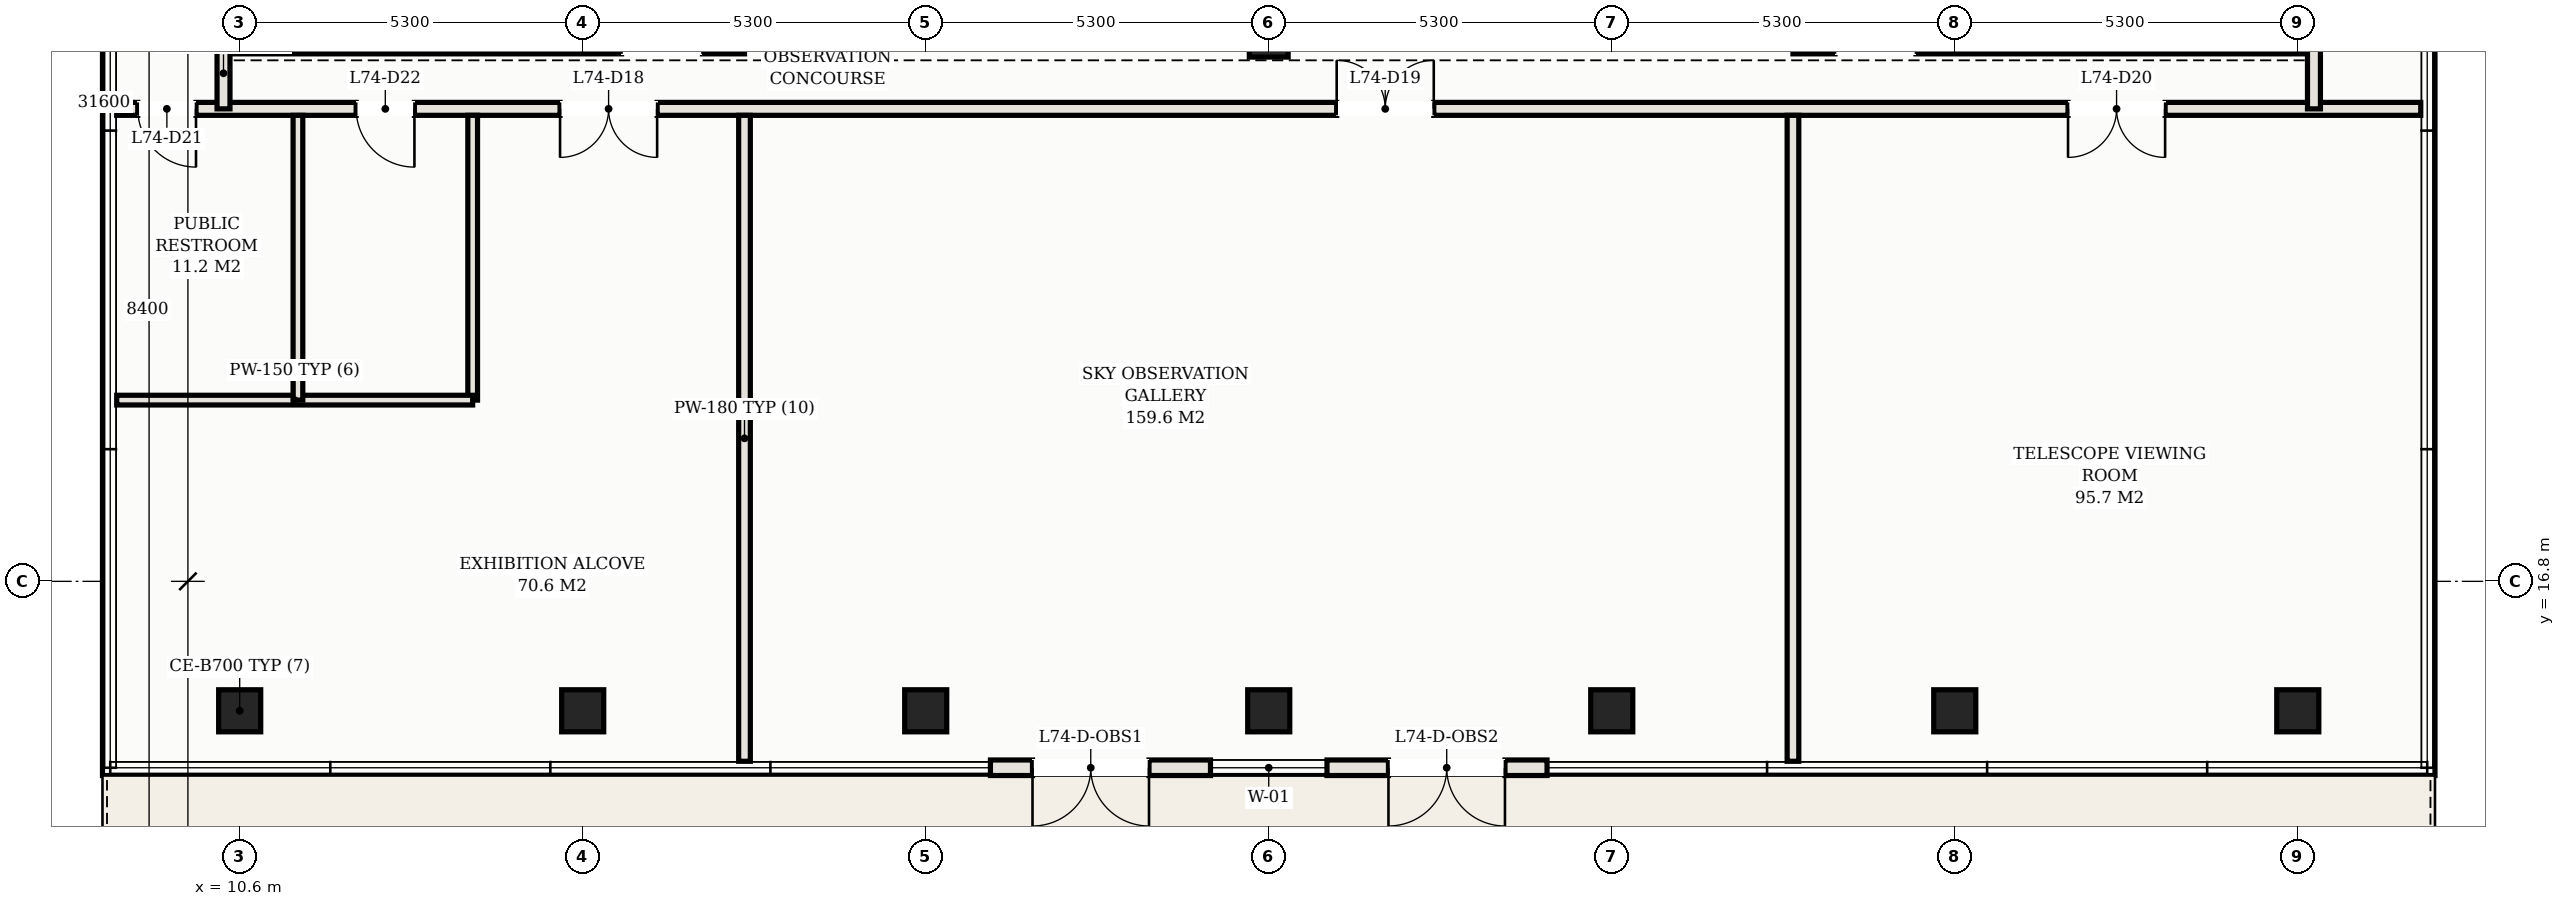
"""IFC4 building model, lengths in metres.
Left out: names, types, materials, properties, quantities, classifications, styles, units other than length and angle.
Written with IfcOpenShell. Run it as: python <this file> out.ifc"""

import sys

from ifc_helpers import new_model, si_unit, direction, frame, frame_2d, origin, origin_2d, place, context, subcontext, project, spatial, rectangle, hollow_rectangle, extrude, element, fill, save


model = new_model("IFC4")
c1 = context("Model", 3, precision=1e-05, world=origin(), true_north=direction((0.0, 1.0)))
c2 = subcontext(c1, "Body", "Model", "MODEL_VIEW")
j1 = project(units=[si_unit("LENGTHUNIT", "METRE"), si_unit("PLANEANGLEUNIT", "RADIAN")], contexts=[c1])
p1 = place(None, origin())
s1 = spatial("IfcSite", under=j1, at=p1, CompositionType="ELEMENT")
p2 = place(p1, origin())
s2 = spatial("IfcBuilding", under=s1, at=p2, CompositionType="ELEMENT")
p3 = place(p2, frame((0.0, 0.0, 266.0)))
s3 = spatial("IfcBuildingStorey", under=s2, at=p3, CompositionType="ELEMENT", Elevation=266.0)
p4 = place(p3, frame((10.35, 25.2, 0.0), z_axis=(0.0, 0.0, 1.0), x_axis=(1.0, 0.0, 0.0)))
e1 = element("IfcWall", 1, at=p4, inside=s3, PredefinedType="SHEAR", context=c2, shape_type="SweptSolid", body=[
    extrude(rectangle(XDim=8.05, YDim=0.5, at=frame_2d((4.025, 0.0))), origin(), (0.0, 0.0, 1.0), 4.52),
])
p5 = place(p4, frame((6.15, 0.0, 0.0)))
e2 = element("IfcOpeningElement", 2, at=p5, cuts=e1, PredefinedType="OPENING", context=c2, shape_type="SweptSolid", body=[
    extrude(rectangle(XDim=1.25, YDim=2.2, at=frame_2d((0.625, 1.1))), frame((0.0, 0.26, 0.0), z_axis=(0.0, -1.0, 0.0), x_axis=(1.0, 0.0, 0.0)), (0.0, 0.0, 1.0), 0.52),
])
p6 = place(p3, frame((34.6, 25.2, 0.0), z_axis=(0.0, 0.0, 1.0), x_axis=(1.0, 0.0, 0.0)))
e3 = element("IfcWall", 3, at=p6, inside=s3, PredefinedType="SHEAR", context=c2, shape_type="SweptSolid", body=[
    extrude(rectangle(XDim=8.05, YDim=0.5, at=frame_2d((4.025, 0.0))), origin(), (0.0, 0.0, 1.0), 4.52),
])
p7 = place(p6, frame((0.65, 0.0, 0.0)))
e4 = element("IfcOpeningElement", 4, at=p7, cuts=e3, PredefinedType="OPENING", context=c2, shape_type="SweptSolid", body=[
    extrude(rectangle(XDim=1.25, YDim=2.2, at=frame_2d((0.625, 1.1))), frame((0.0, 0.26, 0.0), z_axis=(0.0, -1.0, 0.0), x_axis=(1.0, 0.0, 0.0)), (0.0, 0.0, 1.0), 0.52),
])
p8 = place(p3, frame((26.5, 25.2, 0.0), z_axis=(0.0, 0.0, 1.0), x_axis=(1.0, 0.0, 0.0)))
e5 = element("IfcColumn", 5, at=p8, inside=s3, PredefinedType="COLUMN", context=c2, shape_type="SweptSolid", body=[
    extrude(hollow_rectangle(XDim=0.6, YDim=0.6, WallThickness=0.022, at=origin_2d()), origin(), (0.0, 0.0, 1.0), 4.8),
])
for number, where, z_axis, x_axis in (
    (6, (15.9, 14.8, 0.0), (0.0, 0.0, 1.0), (1.0, 0.0, 0.0)),
    (7, (21.2, 14.8, 0.0), (0.0, 0.0, 1.0), (1.0, 0.0, 0.0)),
    (8, (26.5, 14.8, 0.0), (0.0, 0.0, 1.0), (1.0, 0.0, 0.0)),
    (9, (31.8, 14.8, 0.0), (0.0, 0.0, 1.0), (1.0, 0.0, 0.0)),
    (10, (37.1, 14.8, 0.0), (0.0, 0.0, 1.0), (1.0, 0.0, 0.0)),
):
    element("IfcColumn", number, at=place(p3, frame(where, z_axis=z_axis, x_axis=x_axis)), inside=s3, PredefinedType="COLUMN", context=c2, shape_type="SweptSolid", body=[
        extrude(hollow_rectangle(XDim=0.65, YDim=0.65, WallThickness=0.022, at=origin_2d()), origin(), (0.0, 0.0, 1.0), 4.8),
    ])
for number, where, z_axis, x_axis in (
    (11, (10.6, 14.8, 0.0), (0.0, 0.0, 1.0), (1.0, 0.0, 0.0)),
    (12, (42.4, 14.8, 0.0), (0.0, 0.0, 1.0), (1.0, 0.0, 0.0)),
):
    element("IfcColumn", number, at=place(p3, frame(where, z_axis=z_axis, x_axis=x_axis)), inside=s3, PredefinedType="COLUMN", context=c2, shape_type="SweptSolid", body=[
        extrude(hollow_rectangle(XDim=0.65, YDim=0.65, WallThickness=0.022, at=origin_2d()), origin(), (0.0, 0.0, 1.0), 4.764),
    ])
p9 = place(p3, frame((22.2, 13.92, 0.0), z_axis=(0.0, 0.0, 1.0), x_axis=(1.0, 0.0, 0.0)))
e13 = element("IfcWall", 13, at=p9, inside=s3, PredefinedType="SOLIDWALL", context=c2, shape_type="SweptSolid", body=[
    extrude(rectangle(XDim=8.6, YDim=0.24, at=frame_2d((4.3, 0.0))), origin(), (0.0, 0.0, 1.0), 4.52),
])
p10 = place(p9, frame((0.65, 0.0, 0.0)))
e14 = element("IfcOpeningElement", 14, at=p10, cuts=e13, PredefinedType="OPENING", context=c2, shape_type="SweptSolid", body=[
    extrude(rectangle(XDim=1.8, YDim=2.3, at=frame_2d((0.9, 1.15))), frame((0.0, 0.13, 0.0), z_axis=(0.0, -1.0, 0.0), x_axis=(1.0, 0.0, 0.0)), (0.0, 0.0, 1.0), 0.26),
])
p11 = place(p9, frame((6.15, 0.0, 0.0)))
e15 = element("IfcOpeningElement", 15, at=p11, cuts=e13, PredefinedType="OPENING", context=c2, shape_type="SweptSolid", body=[
    extrude(rectangle(XDim=1.8, YDim=2.3, at=frame_2d((0.9, 1.15))), frame((0.0, 0.13, 0.0), z_axis=(0.0, -1.0, 0.0), x_axis=(1.0, 0.0, 0.0)), (0.0, 0.0, 1.0), 0.26),
])
p12 = place(p9, frame((3.4, 0.0, 0.85)))
e16 = element("IfcOpeningElement", 16, at=p12, cuts=e13, PredefinedType="OPENING", context=c2, shape_type="SweptSolid", body=[
    extrude(rectangle(XDim=1.8, YDim=1.7, at=frame_2d((0.9, 0.85))), frame((0.0, 0.13, 0.0), z_axis=(0.0, -1.0, 0.0), x_axis=(1.0, 0.0, 0.0)), (0.0, 0.0, 1.0), 0.26),
])
p13 = place(p3, frame((8.7, 24.1, 0.0), z_axis=(0.0, 0.0, 1.0), x_axis=(1.0, 0.0, 0.0)))
e17 = element("IfcWall", 17, at=p13, inside=s3, PredefinedType="PARTITIONING", context=c2, shape_type="SweptSolid", body=[
    extrude(rectangle(XDim=35.6, YDim=0.2, at=frame_2d((17.8, 0.0))), origin(), (0.0, 0.0, 1.0), 4.52),
])
p14 = place(p13, frame((6.85, 0.0, 0.0)))
e18 = element("IfcOpeningElement", 18, at=p14, cuts=e17, PredefinedType="OPENING", context=c2, shape_type="SweptSolid", body=[
    extrude(rectangle(XDim=1.5, YDim=2.25, at=frame_2d((0.75, 1.125))), frame((0.0, 0.11, 0.0), z_axis=(0.0, -1.0, 0.0), x_axis=(1.0, 0.0, 0.0)), (0.0, 0.0, 1.0), 0.22),
])
p15 = place(p13, frame((18.85, 0.0, 0.0)))
e19 = element("IfcOpeningElement", 19, at=p15, cuts=e17, PredefinedType="OPENING", context=c2, shape_type="SweptSolid", body=[
    extrude(rectangle(XDim=1.5, YDim=2.25, at=frame_2d((0.75, 1.125))), frame((0.0, 0.11, 0.0), z_axis=(0.0, -1.0, 0.0), x_axis=(1.0, 0.0, 0.0)), (0.0, 0.0, 1.0), 0.22),
])
p16 = place(p13, frame((30.15, 0.0, 0.0)))
e20 = element("IfcOpeningElement", 20, at=p16, cuts=e17, PredefinedType="OPENING", context=c2, shape_type="SweptSolid", body=[
    extrude(rectangle(XDim=1.5, YDim=2.25, at=frame_2d((0.75, 1.125))), frame((0.0, 0.11, 0.0), z_axis=(0.0, -1.0, 0.0), x_axis=(1.0, 0.0, 0.0)), (0.0, 0.0, 1.0), 0.22),
])
p17 = place(p13, frame((0.325, 0.0, 0.0)))
e21 = element("IfcOpeningElement", 21, at=p17, cuts=e17, PredefinedType="OPENING", context=c2, shape_type="SweptSolid", body=[
    extrude(rectangle(XDim=0.9, YDim=2.15, at=frame_2d((0.45, 1.075))), frame((0.0, 0.11, 0.0), z_axis=(0.0, -1.0, 0.0), x_axis=(1.0, 0.0, 0.0)), (0.0, 0.0, 1.0), 0.22),
])
p18 = place(p13, frame((3.7, 0.0, 0.0)))
e22 = element("IfcOpeningElement", 22, at=p18, cuts=e17, PredefinedType="OPENING", context=c2, shape_type="SweptSolid", body=[
    extrude(rectangle(XDim=0.9, YDim=2.15, at=frame_2d((0.45, 1.075))), frame((0.0, 0.11, 0.0), z_axis=(0.0, -1.0, 0.0), x_axis=(1.0, 0.0, 0.0)), (0.0, 0.0, 1.0), 0.22),
])
for number, where, z_axis, x_axis in (
    (23, (18.4, 14.02, 0.0), (0.0, 0.0, 1.0), (0.0, 1.0, 0.0)),
    (24, (34.6, 14.02, 0.0), (0.0, 0.0, 1.0), (0.0, 1.0, 0.0)),
):
    element("IfcWall", number, at=place(p3, frame(where, z_axis=z_axis, x_axis=x_axis)), inside=s3, PredefinedType="PARTITIONING", context=c2, shape_type="SweptSolid", body=[
        extrude(rectangle(XDim=9.98, YDim=0.18, at=frame_2d((4.99, 0.0))), origin(), (0.0, 0.0, 1.0), 4.52),
    ])
for number, where, z_axis, x_axis in (
    (25, (10.35, 24.1, 0.0), (0.0, 0.0, 1.0), (0.0, 1.0, 0.0)),
    (26, (42.65, 24.1, 0.0), (0.0, 0.0, 1.0), (0.0, 1.0, 0.0)),
):
    element("IfcWall", number, at=place(p3, frame(where, z_axis=z_axis, x_axis=x_axis)), inside=s3, PredefinedType="PARTITIONING", context=c2, shape_type="SweptSolid", body=[
        extrude(rectangle(XDim=1.1, YDim=0.2, at=frame_2d((0.55, 0.0))), origin(), (0.0, 0.0, 1.0), 3.865),
    ])
p19 = place(p3, frame((14.2, 19.6, 0.0), z_axis=(0.0, 0.0, 1.0), x_axis=(0.0, 1.0, 0.0)))
e27 = element("IfcWall", 27, at=p19, inside=s3, PredefinedType="PARTITIONING", context=c2, shape_type="SweptSolid", body=[
    extrude(rectangle(XDim=4.4, YDim=0.15, at=frame_2d((2.2, 0.0))), origin(), (0.0, 0.0, 1.0), 4.52),
])
p20 = place(p3, frame((8.7, 19.6, 0.0), z_axis=(0.0, 0.0, 1.0), x_axis=(1.0, 0.0, 0.0)))
e28 = element("IfcWall", 28, at=p20, inside=s3, PredefinedType="PARTITIONING", context=c2, shape_type="SweptSolid", body=[
    extrude(rectangle(XDim=5.5, YDim=0.15, at=frame_2d((2.75, 0.0))), origin(), (0.0, 0.0, 1.0), 4.52),
])
p21 = place(p3, frame((11.5, 19.6, 0.0), z_axis=(0.0, 0.0, 1.0), x_axis=(0.0, 1.0, 0.0)))
e29 = element("IfcWall", 29, at=p21, inside=s3, PredefinedType="PARTITIONING", context=c2, shape_type="SweptSolid", body=[
    extrude(rectangle(XDim=4.4, YDim=0.15, at=frame_2d((2.2, 0.0))), origin(), (0.0, 0.0, 1.0), 4.52),
])
p22 = place(p10, frame((1.8, 0.0, 0.0), z_axis=(0.0, 0.0, 1.0), x_axis=(-1.0, 0.0, 0.0)))
e30 = element("IfcDoor", 30, at=p22, inside=s3, OperationType="DOUBLE_DOOR_SINGLE_SWING", PredefinedType="DOOR", context=c2, shape_type="SweptSolid", body=[
    extrude(rectangle(XDim=1.8, YDim=2.3, at=frame_2d((0.9, 1.15))), frame((0.0, 0.025, 0.0), z_axis=(0.0, -1.0, 0.0), x_axis=(1.0, 0.0, 0.0)), (0.0, 0.0, 1.0), 0.05),
])
fill(e14, e30)
p23 = place(p11, frame((1.8, 0.0, 0.0), z_axis=(0.0, 0.0, 1.0), x_axis=(-1.0, 0.0, 0.0)))
e31 = element("IfcDoor", 31, at=p23, inside=s3, OperationType="DOUBLE_DOOR_SINGLE_SWING", PredefinedType="DOOR", context=c2, shape_type="SweptSolid", body=[
    extrude(rectangle(XDim=1.8, YDim=2.3, at=frame_2d((0.9, 1.15))), frame((0.0, 0.025, 0.0), z_axis=(0.0, -1.0, 0.0), x_axis=(1.0, 0.0, 0.0)), (0.0, 0.0, 1.0), 0.05),
])
fill(e15, e31)
p24 = place(p12, origin())
e32 = element("IfcWindow", 32, at=p24, inside=s3, PartitioningType="SINGLE_PANEL", PredefinedType="WINDOW", context=c2, shape_type="SweptSolid", body=[
    extrude(rectangle(XDim=1.8, YDim=1.7, at=frame_2d((0.9, 0.85))), frame((0.0, 0.03, 0.0), z_axis=(0.0, -1.0, 0.0), x_axis=(1.0, 0.0, 0.0)), (0.0, 0.0, 1.0), 0.06),
])
fill(e16, e32)
p25 = place(p14, frame((1.5, 0.0, 0.0), z_axis=(0.0, 0.0, 1.0), x_axis=(-1.0, 0.0, 0.0)))
e33 = element("IfcDoor", 33, at=p25, inside=s3, OperationType="DOUBLE_DOOR_SINGLE_SWING", PredefinedType="DOOR", context=c2, shape_type="SweptSolid", body=[
    extrude(rectangle(XDim=1.5, YDim=2.25, at=frame_2d((0.75, 1.125))), frame((0.0, 0.025, 0.0), z_axis=(0.0, -1.0, 0.0), x_axis=(1.0, 0.0, 0.0)), (0.0, 0.0, 1.0), 0.05),
])
fill(e18, e33)
p26 = place(p15, origin())
e34 = element("IfcDoor", 34, at=p26, inside=s3, OperationType="DOUBLE_DOOR_SINGLE_SWING", PredefinedType="DOOR", context=c2, shape_type="SweptSolid", body=[
    extrude(rectangle(XDim=1.5, YDim=2.25, at=frame_2d((0.75, 1.125))), frame((0.0, 0.025, 0.0), z_axis=(0.0, -1.0, 0.0), x_axis=(1.0, 0.0, 0.0)), (0.0, 0.0, 1.0), 0.05),
])
fill(e19, e34)
p27 = place(p16, frame((1.5, 0.0, 0.0), z_axis=(0.0, 0.0, 1.0), x_axis=(-1.0, 0.0, 0.0)))
e35 = element("IfcDoor", 35, at=p27, inside=s3, OperationType="DOUBLE_DOOR_SINGLE_SWING", PredefinedType="DOOR", context=c2, shape_type="SweptSolid", body=[
    extrude(rectangle(XDim=1.5, YDim=2.25, at=frame_2d((0.75, 1.125))), frame((0.0, 0.025, 0.0), z_axis=(0.0, -1.0, 0.0), x_axis=(1.0, 0.0, 0.0)), (0.0, 0.0, 1.0), 0.05),
])
fill(e20, e35)
p28 = place(p17, frame((0.9, 0.0, 0.0), z_axis=(0.0, 0.0, 1.0), x_axis=(-1.0, 0.0, 0.0)))
e36 = element("IfcDoor", 36, at=p28, inside=s3, OperationType="SINGLE_SWING_LEFT", PredefinedType="DOOR", context=c2, shape_type="SweptSolid", body=[
    extrude(rectangle(XDim=0.9, YDim=2.15, at=frame_2d((0.45, 1.075))), frame((0.0, 0.025, 0.0), z_axis=(0.0, -1.0, 0.0), x_axis=(1.0, 0.0, 0.0)), (0.0, 0.0, 1.0), 0.05),
])
fill(e21, e36)
p29 = place(p18, frame((0.9, 0.0, 0.0), z_axis=(0.0, 0.0, 1.0), x_axis=(-1.0, 0.0, 0.0)))
e37 = element("IfcDoor", 37, at=p29, inside=s3, OperationType="SINGLE_SWING_LEFT", PredefinedType="DOOR", context=c2, shape_type="SweptSolid", body=[
    extrude(rectangle(XDim=0.9, YDim=2.15, at=frame_2d((0.45, 1.075))), frame((0.0, 0.025, 0.0), z_axis=(0.0, -1.0, 0.0), x_axis=(1.0, 0.0, 0.0)), (0.0, 0.0, 1.0), 0.05),
])
fill(e22, e37)
save(model, sys.argv[1])
